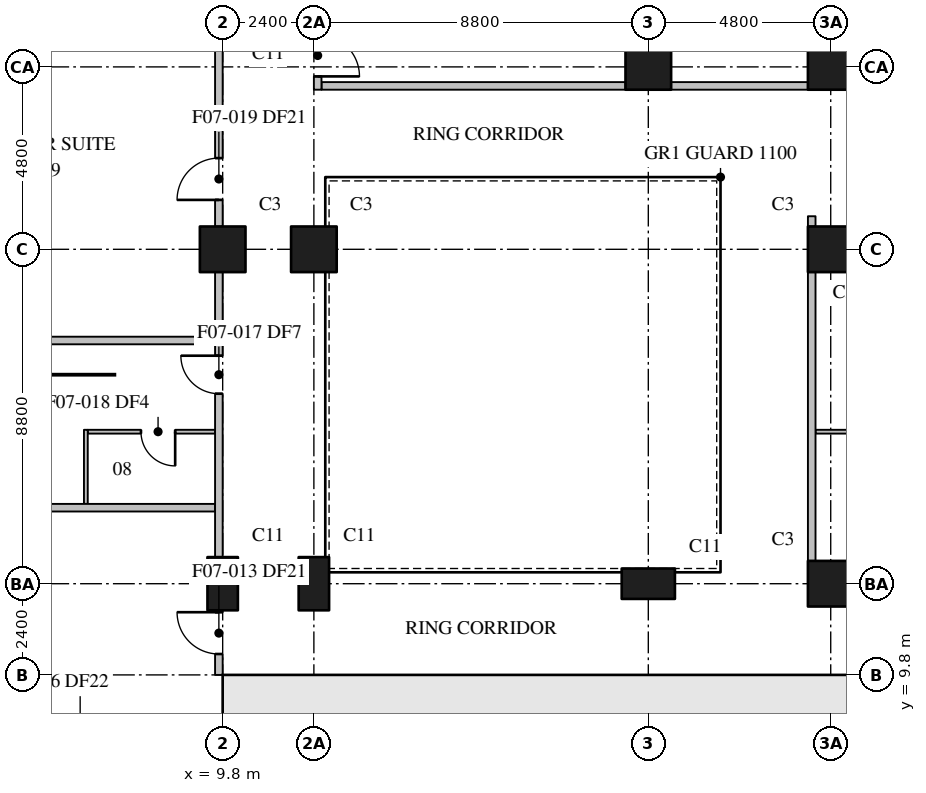
"""IFC4 building model, lengths in metres.
Left out: names, types, materials, properties, quantities, classifications, styles, units other than length and angle.
Written with IfcOpenShell. Run it as: python <this file> out.ifc"""

import sys

from ifc_helpers import new_model, si_unit, direction, frame, frame_2d, origin, origin_2d, place, context, subcontext, project, spatial, rectangle, extrude, element, fill, save


model = new_model("IFC4")
c1 = context("Model", 3, precision=1e-05, world=origin(), true_north=direction((0.0, 1.0)))
c2 = subcontext(c1, "Body", "Model", "MODEL_VIEW")
j1 = project(units=[si_unit("LENGTHUNIT", "METRE"), si_unit("PLANEANGLEUNIT", "RADIAN")], contexts=[c1])
p1 = place(None, origin())
s1 = spatial("IfcSite", under=j1, at=p1, CompositionType="ELEMENT")
p2 = place(p1, origin())
s2 = spatial("IfcBuilding", under=s1, at=p2, CompositionType="ELEMENT")
p3 = place(p2, frame((0.0, 0.0, 83.4)))
s3 = spatial("IfcBuildingStorey", under=s2, at=p3, CompositionType="ELEMENT", Elevation=83.4)
p4 = place(p3, frame((9.8, 12.2, 0.0), z_axis=(0.0, 0.0, 1.0), x_axis=(0.0, 1.0, 0.0)))
e1 = element("IfcColumn", 1, at=p4, inside=s3, PredefinedType="COLUMN", context=c2, shape_type="SweptSolid", body=[
    extrude(rectangle(XDim=1.4, YDim=0.8, at=origin_2d()), origin(), (0.0, 0.0, 1.0), 3.7),
])
p5 = place(p3, frame((9.8, 21.0, 0.0), z_axis=(0.0, 0.0, 1.0), x_axis=(1.0, 0.0, 0.0)))
e2 = element("IfcColumn", 2, at=p5, inside=s3, PredefinedType="COLUMN", context=c2, shape_type="SweptSolid", body=[
    extrude(rectangle(XDim=1.2, YDim=1.2, at=origin_2d()), origin(), (0.0, 0.0, 1.0), 3.7),
])
p6 = place(p3, frame((12.2, 12.2, 0.0), z_axis=(0.0, 0.0, 1.0), x_axis=(0.0, 1.0, 0.0)))
e3 = element("IfcColumn", 3, at=p6, inside=s3, PredefinedType="COLUMN", context=c2, shape_type="SweptSolid", body=[
    extrude(rectangle(XDim=1.4, YDim=0.8, at=origin_2d()), origin(), (0.0, 0.0, 1.0), 3.7),
])
p7 = place(p3, frame((12.2, 21.0, 0.0), z_axis=(0.0, 0.0, 1.0), x_axis=(1.0, 0.0, 0.0)))
e4 = element("IfcColumn", 4, at=p7, inside=s3, PredefinedType="COLUMN", context=c2, shape_type="SweptSolid", body=[
    extrude(rectangle(XDim=1.2, YDim=1.2, at=origin_2d()), origin(), (0.0, 0.0, 1.0), 3.7),
])
p8 = place(p3, frame((21.0, 12.2, 0.0), z_axis=(0.0, 0.0, 1.0), x_axis=(1.0, 0.0, 0.0)))
e5 = element("IfcColumn", 5, at=p8, inside=s3, PredefinedType="COLUMN", context=c2, shape_type="SweptSolid", body=[
    extrude(rectangle(XDim=1.4, YDim=0.8, at=origin_2d()), origin(), (0.0, 0.0, 1.0), 3.7),
])
for number, where, z_axis, x_axis in (
    (6, (21.0, 25.8, 0.0), (0.0, 0.0, 1.0), (1.0, 0.0, 0.0)),
    (7, (25.8, 12.2, 0.0), (0.0, 0.0, 1.0), (1.0, 0.0, 0.0)),
    (8, (25.8, 21.0, 0.0), (0.0, 0.0, 1.0), (1.0, 0.0, 0.0)),
    (9, (25.8, 25.8, 0.0), (0.0, 0.0, 1.0), (1.0, 0.0, 0.0)),
):
    element("IfcColumn", number, at=place(p3, frame(where, z_axis=z_axis, x_axis=x_axis)), inside=s3, PredefinedType="COLUMN", context=c2, shape_type="SweptSolid", body=[
        extrude(rectangle(XDim=1.2, YDim=1.2, at=origin_2d()), origin(), (0.0, 0.0, 1.0), 3.7),
    ])
p9 = place(p3, frame((10.6, 1.2, 0.0), z_axis=(0.0, 0.0, 1.0), x_axis=(0.0, 1.0, 0.0)))
e10 = element("IfcWall", 10, at=p9, inside=s3, PredefinedType="SHEAR", context=c2, shape_type="SweptSolid", body=[
    extrude(rectangle(XDim=8.6, YDim=0.8, at=frame_2d((4.3, 0.0))), origin(), (0.0, 0.0, 1.0), 3.7),
])
p10 = place(p3, frame((9.8, 9.6, 0.0), z_axis=(0.0, 0.0, 1.0), x_axis=(1.0, 0.0, 0.0)))
e11 = element("IfcWall", 11, at=p10, inside=s3, PredefinedType="SHEAR", context=c2, shape_type="SweptSolid", body=[
    extrude(rectangle(XDim=4.3, YDim=0.4, at=frame_2d((2.15, 0.0))), origin(), (0.0, 0.0, 1.0), 3.7),
])
p11 = place(p10, frame((2.05, 0.0, 0.0)))
e12 = element("IfcOpeningElement", 12, at=p11, cuts=e11, PredefinedType="OPENING", context=c2, shape_type="SweptSolid", body=[
    extrude(rectangle(XDim=1.2, YDim=2.1, at=frame_2d((0.6, 1.05))), frame((0.0, 0.21, 0.0), z_axis=(0.0, -1.0, 0.0), x_axis=(1.0, 0.0, 0.0)), (0.0, 0.0, 1.0), 0.42),
])
p12 = place(p3, frame((14.1, 9.6, 0.0), z_axis=(0.0, 0.0, 1.0), x_axis=(1.0, 0.0, 0.0)))
e13 = element("IfcWall", 13, at=p12, inside=s3, PredefinedType="SHEAR", context=c2, shape_type="SweptSolid", body=[
    extrude(rectangle(XDim=10.4, YDim=0.4, at=frame_2d((5.2, 0.0))), origin(), (0.0, 0.0, 1.0), 3.7),
])
p13 = place(p12, frame((0.8, 0.0, 0.0)))
e14 = element("IfcOpeningElement", 14, at=p13, cuts=e13, PredefinedType="OPENING", context=c2, shape_type="SweptSolid", body=[
    extrude(rectangle(XDim=1.0, YDim=2.1, at=frame_2d((0.5, 1.05))), frame((0.0, 0.21, 0.0), z_axis=(0.0, -1.0, 0.0), x_axis=(1.0, 0.0, 0.0)), (0.0, 0.0, 1.0), 0.42),
])
p14 = place(p3, frame((14.1, 1.2, 0.0), z_axis=(0.0, 0.0, 1.0), x_axis=(0.0, 1.0, 0.0)))
e15 = element("IfcWall", 15, at=p14, inside=s3, PredefinedType="SHEAR", context=c2, shape_type="SweptSolid", body=[
    extrude(rectangle(XDim=8.4, YDim=0.4, at=frame_2d((4.2, 0.0))), origin(), (0.0, 0.0, 1.0), 3.7),
])
p15 = place(p14, frame((4.45, 0.0, 0.0)))
e16 = element("IfcOpeningElement", 16, at=p15, cuts=e15, PredefinedType="OPENING", context=c2, shape_type="SweptSolid", body=[
    extrude(rectangle(XDim=0.9, YDim=2.1, at=frame_2d((0.45, 1.05))), frame((0.0, 0.21, 0.0), z_axis=(0.0, -1.0, 0.0), x_axis=(1.0, 0.0, 0.0)), (0.0, 0.0, 1.0), 0.42),
])
p16 = place(p3, frame((24.5, 7.0, 0.0), z_axis=(0.0, 0.0, 1.0), x_axis=(0.0, 1.0, 0.0)))
e17 = element("IfcWall", 17, at=p16, inside=s3, PredefinedType="SHEAR", context=c2, shape_type="SweptSolid", body=[
    extrude(rectangle(XDim=2.4, YDim=0.25, at=frame_2d((1.2, 0.0))), origin(), (0.0, 0.0, 1.0), 3.7),
])
p17 = place(p3, frame((25.3, 12.8, 0.0), z_axis=(0.0, 0.0, 1.0), x_axis=(0.0, 1.0, 0.0)))
e18 = element("IfcWall", 18, at=p17, inside=s3, PredefinedType="PARTITIONING", context=c2, shape_type="SweptSolid", body=[
    extrude(rectangle(XDim=7.6, YDim=0.2, at=frame_2d((3.8, 0.0))), origin(), (0.0, 0.0, 1.0), 3.4),
])
p18 = place(p3, frame((25.3, 21.6, 0.0), z_axis=(0.0, 0.0, 1.0), x_axis=(0.0, 1.0, 0.0)))
e19 = element("IfcWall", 19, at=p18, inside=s3, PredefinedType="PARTITIONING", context=c2, shape_type="SweptSolid", body=[
    extrude(rectangle(XDim=0.27, YDim=0.2, at=frame_2d((0.135, 0.0))), origin(), (0.0, 0.0, 1.0), 3.4),
])
p19 = place(p3, frame((9.7, 9.8, 0.0), z_axis=(0.0, 0.0, 1.0), x_axis=(0.0, 1.0, 0.0)))
e20 = element("IfcWall", 20, at=p19, inside=s3, PredefinedType="PARTITIONING", context=c2, shape_type="SweptSolid", body=[
    extrude(rectangle(XDim=1.7, YDim=0.2, at=frame_2d((0.85, 0.0))), origin(), (0.0, 0.0, 1.0), 3.4),
])
p20 = place(p19, frame((0.55, 0.0, 0.0)))
e21 = element("IfcOpeningElement", 21, at=p20, cuts=e20, PredefinedType="OPENING", context=c2, shape_type="SweptSolid", body=[
    extrude(rectangle(XDim=1.1, YDim=2.1, at=frame_2d((0.55, 1.05))), frame((0.0, 0.11, 0.0), z_axis=(0.0, -1.0, 0.0), x_axis=(1.0, 0.0, 0.0)), (0.0, 0.0, 1.0), 0.22),
])
p21 = place(p3, frame((9.7, 12.9, 0.0), z_axis=(0.0, 0.0, 1.0), x_axis=(0.0, 1.0, 0.0)))
e22 = element("IfcWall", 22, at=p21, inside=s3, PredefinedType="PARTITIONING", context=c2, shape_type="SweptSolid", body=[
    extrude(rectangle(XDim=7.5, YDim=0.2, at=frame_2d((3.75, 0.0))), origin(), (0.0, 0.0, 1.0), 3.4),
])
p22 = place(p21, frame((4.3, 0.0, 0.0)))
e23 = element("IfcOpeningElement", 23, at=p22, cuts=e22, PredefinedType="OPENING", context=c2, shape_type="SweptSolid", body=[
    extrude(rectangle(XDim=1.0, YDim=2.1, at=frame_2d((0.5, 1.05))), frame((0.0, 0.11, 0.0), z_axis=(0.0, -1.0, 0.0), x_axis=(1.0, 0.0, 0.0)), (0.0, 0.0, 1.0), 0.22),
])
p23 = place(p3, frame((9.7, 21.6, 0.0), z_axis=(0.0, 0.0, 1.0), x_axis=(0.0, 1.0, 0.0)))
e24 = element("IfcWall", 24, at=p23, inside=s3, PredefinedType="PARTITIONING", context=c2, shape_type="SweptSolid", body=[
    extrude(rectangle(XDim=5.1, YDim=0.2, at=frame_2d((2.55, 0.0))), origin(), (0.0, 0.0, 1.0), 3.4),
])
p24 = place(p23, frame((0.7, 0.0, 0.0)))
e25 = element("IfcOpeningElement", 25, at=p24, cuts=e24, PredefinedType="OPENING", context=c2, shape_type="SweptSolid", body=[
    extrude(rectangle(XDim=1.1, YDim=2.1, at=frame_2d((0.55, 1.05))), frame((0.0, 0.11, 0.0), z_axis=(0.0, -1.0, 0.0), x_axis=(1.0, 0.0, 0.0)), (0.0, 0.0, 1.0), 0.22),
])
for number, where, z_axis, x_axis in (
    (26, (0.31, 14.2, 0.0), (0.0, 0.0, 1.0), (1.0, 0.0, 0.0)),
    (27, (0.31, 18.6, 0.0), (0.0, 0.0, 1.0), (1.0, 0.0, 0.0)),
):
    element("IfcWall", number, at=place(p3, frame(where, z_axis=z_axis, x_axis=x_axis)), inside=s3, PredefinedType="PARTITIONING", context=c2, shape_type="SweptSolid", body=[
        extrude(rectangle(XDim=9.29, YDim=0.2, at=frame_2d((4.645, 0.0))), origin(), (0.0, 0.0, 1.0), 3.4),
    ])
p25 = place(p3, frame((12.3, 26.7, 0.0), z_axis=(0.0, 0.0, 1.0), x_axis=(0.0, -1.0, 0.0)))
e28 = element("IfcWall", 28, at=p25, inside=s3, PredefinedType="PARTITIONING", context=c2, shape_type="SweptSolid", body=[
    extrude(rectangle(XDim=1.5, YDim=0.2, at=frame_2d((0.75, 0.0))), origin(), (0.0, 0.0, 1.0), 3.4),
])
p26 = place(p25, frame((0.05, 0.0, 0.0)))
e29 = element("IfcOpeningElement", 29, at=p26, cuts=e28, PredefinedType="OPENING", context=c2, shape_type="SweptSolid", body=[
    extrude(rectangle(XDim=1.1, YDim=2.1, at=frame_2d((0.55, 1.05))), frame((0.0, 0.11, 0.0), z_axis=(0.0, -1.0, 0.0), x_axis=(1.0, 0.0, 0.0)), (0.0, 0.0, 1.0), 0.22),
])
p27 = place(p3, frame((12.4, 25.3, 0.0), z_axis=(0.0, 0.0, 1.0), x_axis=(1.0, 0.0, 0.0)))
e30 = element("IfcWall", 30, at=p27, inside=s3, PredefinedType="PARTITIONING", context=c2, shape_type="SweptSolid", body=[
    extrude(rectangle(XDim=8.0, YDim=0.2, at=frame_2d((4.0, 0.0))), origin(), (0.0, 0.0, 1.0), 3.4),
])
p28 = place(p3, frame((21.6, 25.3, 0.0), z_axis=(0.0, 0.0, 1.0), x_axis=(1.0, 0.0, 0.0)))
e31 = element("IfcWall", 31, at=p28, inside=s3, PredefinedType="PARTITIONING", context=c2, shape_type="SweptSolid", body=[
    extrude(rectangle(XDim=3.6, YDim=0.2, at=frame_2d((1.8, 0.0))), origin(), (0.0, 0.0, 1.0), 3.4),
])
p29 = place(p3, frame((9.6, 16.2, 0.0), z_axis=(0.0, 0.0, 1.0), x_axis=(-1.0, 0.0, 0.0)))
e32 = element("IfcWall", 32, at=p29, inside=s3, PredefinedType="PARTITIONING", context=c2, shape_type="SweptSolid", body=[
    extrude(rectangle(XDim=3.35, YDim=0.1, at=frame_2d((1.675, 0.0))), origin(), (0.0, 0.0, 1.0), 3.4),
])
p30 = place(p29, frame((1.05, 0.0, 0.0)))
e33 = element("IfcOpeningElement", 33, at=p30, cuts=e32, PredefinedType="OPENING", context=c2, shape_type="SweptSolid", body=[
    extrude(rectangle(XDim=0.9, YDim=2.1, at=frame_2d((0.45, 1.05))), frame((0.0, 0.06, 0.0), z_axis=(0.0, -1.0, 0.0), x_axis=(1.0, 0.0, 0.0)), (0.0, 0.0, 1.0), 0.12),
])
p31 = place(p3, frame((25.4, 16.2, 0.0), z_axis=(0.0, 0.0, 1.0), x_axis=(1.0, 0.0, 0.0)))
e34 = element("IfcWall", 34, at=p31, inside=s3, PredefinedType="PARTITIONING", context=c2, shape_type="SweptSolid", body=[
    extrude(rectangle(XDim=2.95, YDim=0.1, at=frame_2d((1.475, 0.0))), origin(), (0.0, 0.0, 1.0), 3.4),
])
p32 = place(p3, frame((6.2, 14.3, 0.0), z_axis=(0.0, 0.0, 1.0), x_axis=(0.0, 1.0, 0.0)))
e35 = element("IfcWall", 35, at=p32, inside=s3, PredefinedType="PARTITIONING", context=c2, shape_type="SweptSolid", body=[
    extrude(rectangle(XDim=1.95, YDim=0.1, at=frame_2d((0.975, 0.0))), origin(), (0.0, 0.0, 1.0), 3.4),
])
p33 = place(p13, frame((1.0, 0.0, 0.0), z_axis=(0.0, 0.0, 1.0), x_axis=(-1.0, 0.0, 0.0)))
e36 = element("IfcDoor", 36, at=p33, inside=s3, OperationType="SINGLE_SWING_RIGHT", PredefinedType="DOOR", context=c2, shape_type="SweptSolid", body=[
    extrude(rectangle(XDim=1.0, YDim=2.1, at=frame_2d((0.5, 1.05))), frame((0.0, 0.025, 0.0), z_axis=(0.0, -1.0, 0.0), x_axis=(1.0, 0.0, 0.0)), (0.0, 0.0, 1.0), 0.05),
])
fill(e14, e36)
p34 = place(p11, frame((1.2, 0.0, 0.0), z_axis=(0.0, 0.0, 1.0), x_axis=(-1.0, 0.0, 0.0)))
e37 = element("IfcDoor", 37, at=p34, inside=s3, OperationType="SINGLE_SWING_LEFT", PredefinedType="DOOR", context=c2, shape_type="SweptSolid", body=[
    extrude(rectangle(XDim=1.2, YDim=2.1, at=frame_2d((0.6, 1.05))), frame((0.0, 0.025, 0.0), z_axis=(0.0, -1.0, 0.0), x_axis=(1.0, 0.0, 0.0)), (0.0, 0.0, 1.0), 0.05),
])
fill(e12, e37)
p35 = place(p20, origin())
e38 = element("IfcDoor", 38, at=p35, inside=s3, OperationType="SINGLE_SWING_RIGHT", PredefinedType="DOOR", context=c2, shape_type="SweptSolid", body=[
    extrude(rectangle(XDim=1.1, YDim=2.1, at=frame_2d((0.55, 1.05))), frame((0.0, 0.025, 0.0), z_axis=(0.0, -1.0, 0.0), x_axis=(1.0, 0.0, 0.0)), (0.0, 0.0, 1.0), 0.05),
])
fill(e21, e38)
p36 = place(p22, origin())
e39 = element("IfcDoor", 39, at=p36, inside=s3, OperationType="SINGLE_SWING_RIGHT", PredefinedType="DOOR", context=c2, shape_type="SweptSolid", body=[
    extrude(rectangle(XDim=1.0, YDim=2.1, at=frame_2d((0.5, 1.05))), frame((0.0, 0.025, 0.0), z_axis=(0.0, -1.0, 0.0), x_axis=(1.0, 0.0, 0.0)), (0.0, 0.0, 1.0), 0.05),
])
fill(e23, e39)
p37 = place(p30, origin())
e40 = element("IfcDoor", 40, at=p37, inside=s3, OperationType="SINGLE_SWING_LEFT", PredefinedType="DOOR", context=c2, shape_type="SweptSolid", body=[
    extrude(rectangle(XDim=0.9, YDim=2.1, at=frame_2d((0.45, 1.05))), frame((0.0, 0.025, 0.0), z_axis=(0.0, -1.0, 0.0), x_axis=(1.0, 0.0, 0.0)), (0.0, 0.0, 1.0), 0.05),
])
fill(e33, e40)
p38 = place(p24, origin())
e41 = element("IfcDoor", 41, at=p38, inside=s3, OperationType="SINGLE_SWING_LEFT", PredefinedType="DOOR", context=c2, shape_type="SweptSolid", body=[
    extrude(rectangle(XDim=1.1, YDim=2.1, at=frame_2d((0.55, 1.05))), frame((0.0, 0.025, 0.0), z_axis=(0.0, -1.0, 0.0), x_axis=(1.0, 0.0, 0.0)), (0.0, 0.0, 1.0), 0.05),
])
fill(e25, e41)
p39 = place(p26, origin())
e42 = element("IfcDoor", 42, at=p39, inside=s3, OperationType="SINGLE_SWING_RIGHT", PredefinedType="DOOR", context=c2, shape_type="SweptSolid", body=[
    extrude(rectangle(XDim=1.1, YDim=2.1, at=frame_2d((0.55, 1.05))), frame((0.0, 0.025, 0.0), z_axis=(0.0, -1.0, 0.0), x_axis=(1.0, 0.0, 0.0)), (0.0, 0.0, 1.0), 0.05),
])
fill(e29, e42)
save(model, sys.argv[1])
